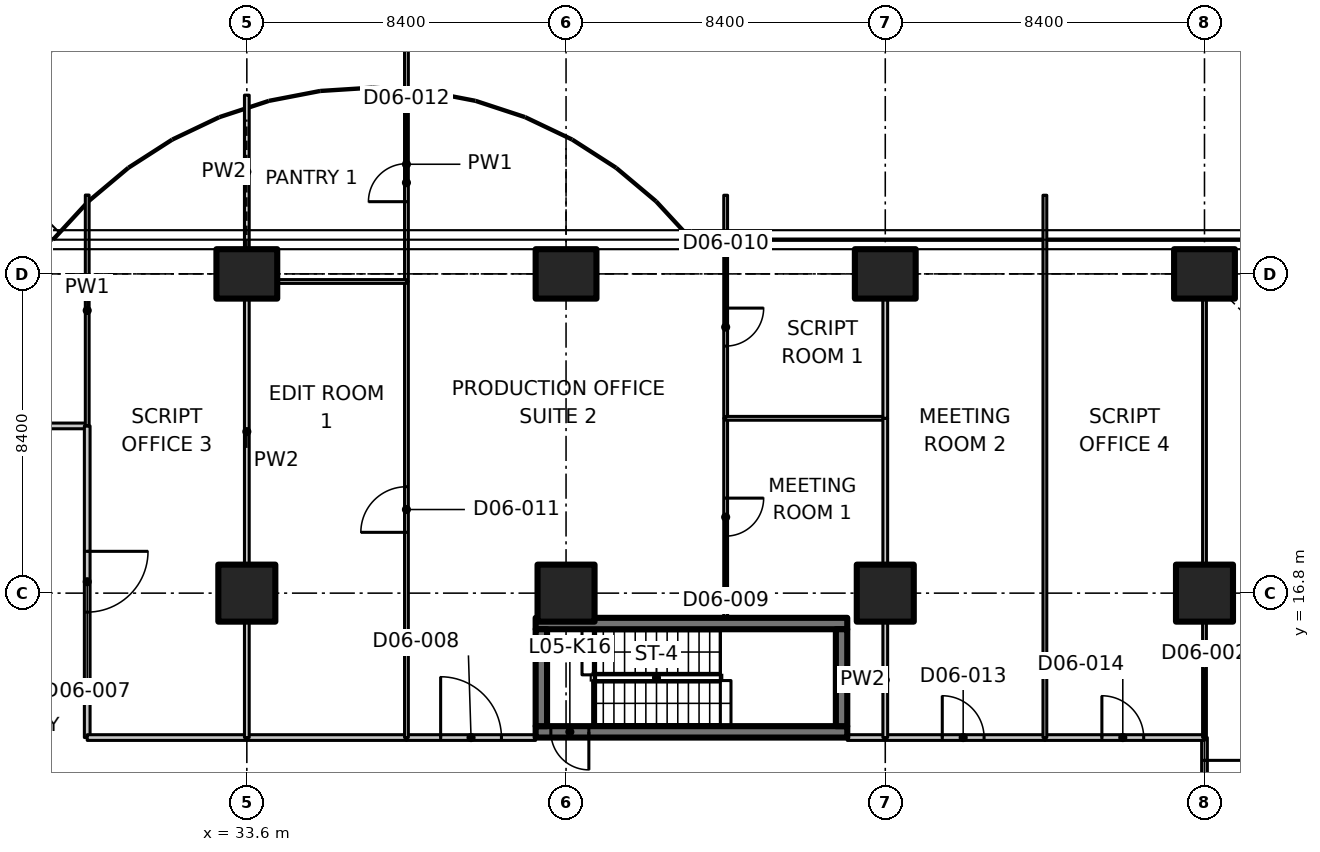
"""IFC4 building model, lengths in metres.
Left out: names, types, materials, properties, quantities, classifications, styles, units other than length and angle.
Written with IfcOpenShell. Run it as: python <this file> out.ifc"""

import sys

from ifc_helpers import new_model, si_unit, direction, frame, frame_2d, origin, origin_2d, place, context, subcontext, project, spatial, polyline, rectangle, outline, extrude, element, fill, save


model = new_model("IFC4")
c1 = context("Model", 3, precision=1e-05, world=origin(), true_north=direction((0.0, 1.0)))
c2 = subcontext(c1, "Body", "Model", "MODEL_VIEW")
j1 = project(units=[si_unit("LENGTHUNIT", "METRE"), si_unit("PLANEANGLEUNIT", "RADIAN")], contexts=[c1])
p1 = place(None, origin())
s1 = spatial("IfcSite", under=j1, at=p1, CompositionType="ELEMENT")
p2 = place(p1, origin())
s2 = spatial("IfcBuilding", under=s1, at=p2, CompositionType="ELEMENT")
p3 = place(p2, frame((0.0, 0.0, 32.0)))
s3 = spatial("IfcBuildingStorey", under=s2, at=p3, CompositionType="ELEMENT", Elevation=32.0)
p4 = place(p3, frame((33.6, 16.8, 0.0), z_axis=(0.0, 0.0, 1.0), x_axis=(1.0, 0.0, 0.0)))
e1 = element("IfcColumn", 1, at=p4, inside=s3, PredefinedType="COLUMN", context=c2, shape_type="SweptSolid", body=[
    extrude(rectangle(XDim=1.5, YDim=1.5, at=origin_2d()), origin(), (0.0, 0.0, 1.0), 4.25),
])
p5 = place(p3, frame((33.6, 25.2, 0.0), z_axis=(0.0, 0.0, 1.0), x_axis=(0.0, 1.0, 0.0)))
e2 = element("IfcColumn", 2, at=p5, inside=s3, PredefinedType="COLUMN", context=c2, shape_type="SweptSolid", body=[
    extrude(rectangle(XDim=1.3, YDim=1.6, at=origin_2d()), origin(), (0.0, 0.0, 1.0), 4.25),
])
p6 = place(p3, frame((42.0, 16.8, 0.0), z_axis=(0.0, 0.0, 1.0), x_axis=(1.0, 0.0, 0.0)))
e3 = element("IfcColumn", 3, at=p6, inside=s3, PredefinedType="COLUMN", context=c2, shape_type="SweptSolid", body=[
    extrude(rectangle(XDim=1.5, YDim=1.5, at=origin_2d()), origin(), (0.0, 0.0, 1.0), 4.25),
])
p7 = place(p3, frame((42.0, 25.2, 0.0), z_axis=(0.0, 0.0, 1.0), x_axis=(0.0, 1.0, 0.0)))
e4 = element("IfcColumn", 4, at=p7, inside=s3, PredefinedType="COLUMN", context=c2, shape_type="SweptSolid", body=[
    extrude(rectangle(XDim=1.3, YDim=1.6, at=origin_2d()), origin(), (0.0, 0.0, 1.0), 4.25),
])
p8 = place(p3, frame((50.4, 16.8, 0.0), z_axis=(0.0, 0.0, 1.0), x_axis=(1.0, 0.0, 0.0)))
e5 = element("IfcColumn", 5, at=p8, inside=s3, PredefinedType="COLUMN", context=c2, shape_type="SweptSolid", body=[
    extrude(rectangle(XDim=1.5, YDim=1.5, at=origin_2d()), origin(), (0.0, 0.0, 1.0), 4.25),
])
p9 = place(p3, frame((50.4, 25.2, 0.0), z_axis=(0.0, 0.0, 1.0), x_axis=(0.0, 1.0, 0.0)))
e6 = element("IfcColumn", 6, at=p9, inside=s3, PredefinedType="COLUMN", context=c2, shape_type="SweptSolid", body=[
    extrude(rectangle(XDim=1.3, YDim=1.6, at=origin_2d()), origin(), (0.0, 0.0, 1.0), 4.25),
])
p10 = place(p3, frame((58.8, 16.8, 0.0), z_axis=(0.0, 0.0, 1.0), x_axis=(1.0, 0.0, 0.0)))
e7 = element("IfcColumn", 7, at=p10, inside=s3, PredefinedType="COLUMN", context=c2, shape_type="SweptSolid", body=[
    extrude(rectangle(XDim=1.5, YDim=1.5, at=origin_2d()), origin(), (0.0, 0.0, 1.0), 4.25),
])
p11 = place(p3, frame((58.8, 25.2, 0.0), z_axis=(0.0, 0.0, 1.0), x_axis=(0.0, 1.0, 0.0)))
e8 = element("IfcColumn", 8, at=p11, inside=s3, PredefinedType="COLUMN", context=c2, shape_type="SweptSolid", body=[
    extrude(rectangle(XDim=1.3, YDim=1.6, at=origin_2d()), origin(), (0.0, 0.0, 1.0), 4.25),
])
p12 = place(p3, frame((49.4, 13.15, 0.0), z_axis=(0.0, 0.0, 1.0), x_axis=(-1.0, 0.0, 0.0)))
e9 = element("IfcWall", 9, at=p12, inside=s3, PredefinedType="SHEAR", context=c2, shape_type="SweptSolid", body=[
    extrude(rectangle(XDim=8.2, YDim=0.3, at=frame_2d((4.1, 0.0))), origin(), (0.0, 0.0, 1.0), 4.25),
])
p13 = place(p12, frame((6.8, 0.0, 0.0)))
e10 = element("IfcOpeningElement", 10, at=p13, cuts=e9, PredefinedType="OPENING", context=c2, shape_type="SweptSolid", body=[
    extrude(rectangle(XDim=1.0, YDim=2.1, at=frame_2d((0.5, 1.05))), frame((0.0, 0.16, 0.0), z_axis=(0.0, -1.0, 0.0), x_axis=(1.0, 0.0, 0.0)), (0.0, 0.0, 1.0), 0.32),
])
p14 = place(p3, frame((41.2, 16.0, 0.0), z_axis=(0.0, 0.0, 1.0), x_axis=(1.0, 0.0, 0.0)))
e11 = element("IfcWall", 11, at=p14, inside=s3, PredefinedType="SHEAR", context=c2, shape_type="SweptSolid", body=[
    extrude(rectangle(XDim=8.2, YDim=0.3, at=frame_2d((4.1, 0.0))), origin(), (0.0, 0.0, 1.0), 4.25),
])
for number, where, z_axis, x_axis in (
    (12, (41.35, 13.3, 0.0), (0.0, 0.0, 1.0), (0.0, 1.0, 0.0)),
    (13, (49.25, 13.3, 0.0), (0.0, 0.0, 1.0), (0.0, 1.0, 0.0)),
):
    element("IfcWall", number, at=place(p3, frame(where, z_axis=z_axis, x_axis=x_axis)), inside=s3, PredefinedType="SHEAR", context=c2, shape_type="SweptSolid", body=[
        extrude(rectangle(XDim=2.55, YDim=0.3, at=frame_2d((1.275, 0.0))), origin(), (0.0, 0.0, 1.0), 4.25),
    ])
p15 = place(p3, frame((25.2, 21.2, 0.0), z_axis=(0.0, 0.0, 1.0), x_axis=(1.0, 0.0, 0.0)))
e14 = element("IfcWall", 14, at=p15, inside=s3, PredefinedType="PARTITIONING", context=c2, shape_type="SweptSolid", body=[
    extrude(rectangle(XDim=4.2, YDim=0.15, at=frame_2d((2.1, 0.0))), origin(), (0.0, 0.0, 1.0), 4.23),
])
p16 = place(p3, frame((29.4, 21.2, 0.0), z_axis=(0.0, 0.0, 1.0), x_axis=(0.0, -1.0, 0.0)))
e15 = element("IfcWall", 15, at=p16, inside=s3, PredefinedType="PARTITIONING", context=c2, shape_type="SweptSolid", body=[
    extrude(rectangle(XDim=8.2, YDim=0.15, at=frame_2d((4.1, 0.0))), origin(), (0.0, 0.0, 1.0), 4.23),
])
p17 = place(p16, frame((3.3, 0.0, 0.0)))
e16 = element("IfcOpeningElement", 16, at=p17, cuts=e15, PredefinedType="OPENING", context=c2, shape_type="SweptSolid", body=[
    extrude(rectangle(XDim=1.6, YDim=2.1, at=frame_2d((0.8, 1.05))), frame((0.0, 0.085, 0.0), z_axis=(0.0, -1.0, 0.0), x_axis=(1.0, 0.0, 0.0)), (0.0, 0.0, 1.0), 0.17),
])
p18 = place(p3, frame((29.4, 27.275, 0.0), z_axis=(0.0, 0.0, 1.0), x_axis=(0.0, -1.0, 0.0)))
e17 = element("IfcWall", 17, at=p18, inside=s3, PredefinedType="PARTITIONING", context=c2, shape_type="SweptSolid", body=[
    extrude(outline(polyline([(0.0, 0.0), (6.075, 0.0), (6.075, 4.23), (2.525, 4.23), (2.523, 3.88), (1.627, 3.88), (1.625, 4.23), (0.0, 4.23), (0.0, 0.0)])), frame((0.0, 0.05, 0.0), z_axis=(0.0, -1.0, 0.0), x_axis=(1.0, 0.0, 0.0)), (0.0, 0.0, 1.0), 0.1),
])
p19 = place(p3, frame((28.432, 31.168, 0.0), z_axis=(0.0, 0.0, 1.0), x_axis=(-0.540854867502, -0.841115932734, 0.0)))
e18 = element("IfcWall", 18, at=p19, inside=s3, PredefinedType="PARTITIONING", context=c2, shape_type="SweptSolid", body=[
    extrude(rectangle(XDim=1.015, YDim=0.15, at=frame_2d((0.507, 0.0))), origin(), (0.0, 0.0, 1.0), 4.23),
])
p20 = place(p3, frame((58.8, 13.0, 0.0), z_axis=(0.0, 0.0, 1.0), x_axis=(0.0, -1.0, 0.0)))
e19 = element("IfcWall", 19, at=p20, inside=s3, PredefinedType="PARTITIONING", context=c2, shape_type="SweptSolid", body=[
    extrude(rectangle(XDim=3.4, YDim=0.15, at=frame_2d((1.7, 0.0))), origin(), (0.0, 0.0, 1.0), 4.23),
])
p21 = place(p20, frame((0.6, 0.0, 0.0)))
e20 = element("IfcOpeningElement", 20, at=p21, cuts=e19, PredefinedType="OPENING", context=c2, shape_type="SweptSolid", body=[
    extrude(rectangle(XDim=2.0, YDim=2.4, at=frame_2d((1.0, 1.2))), frame((0.0, 0.085, 0.0), z_axis=(0.0, -1.0, 0.0), x_axis=(1.0, 0.0, 0.0)), (0.0, 0.0, 1.0), 0.17),
])
p22 = place(p3, frame((29.4, 13.0, 0.0), z_axis=(0.0, 0.0, 1.0), x_axis=(1.0, 0.0, 0.0)))
e21 = element("IfcWall", 21, at=p22, inside=s3, PredefinedType="PARTITIONING", context=c2, shape_type="SweptSolid", body=[
    extrude(rectangle(XDim=4.2, YDim=0.15, at=frame_2d((2.1, 0.0))), origin(), (0.0, 0.0, 1.0), 4.23),
])
p23 = place(p3, frame((37.8, 13.0, 0.0), z_axis=(0.0, 0.0, 1.0), x_axis=(1.0, 0.0, 0.0)))
e22 = element("IfcWall", 22, at=p23, inside=s3, PredefinedType="PARTITIONING", context=c2, shape_type="SweptSolid", body=[
    extrude(rectangle(XDim=3.4, YDim=0.15, at=frame_2d((1.7, 0.0))), origin(), (0.0, 0.0, 1.0), 4.23),
])
p24 = place(p23, frame((0.9, 0.0, 0.0)))
e23 = element("IfcOpeningElement", 23, at=p24, cuts=e22, PredefinedType="OPENING", context=c2, shape_type="SweptSolid", body=[
    extrude(rectangle(XDim=1.6, YDim=2.1, at=frame_2d((0.8, 1.05))), frame((0.0, 0.085, 0.0), z_axis=(0.0, -1.0, 0.0), x_axis=(1.0, 0.0, 0.0)), (0.0, 0.0, 1.0), 0.17),
])
p25 = place(p3, frame((49.4, 13.0, 0.0), z_axis=(0.0, 0.0, 1.0), x_axis=(1.0, 0.0, 0.0)))
e24 = element("IfcWall", 24, at=p25, inside=s3, PredefinedType="PARTITIONING", context=c2, shape_type="SweptSolid", body=[
    extrude(rectangle(XDim=1.0, YDim=0.15, at=frame_2d((0.5, 0.0))), origin(), (0.0, 0.0, 1.0), 4.23),
])
p26 = place(p3, frame((33.6, 13.0, 0.0), z_axis=(0.0, 0.0, 1.0), x_axis=(1.0, 0.0, 0.0)))
e25 = element("IfcWall", 25, at=p26, inside=s3, PredefinedType="PARTITIONING", context=c2, shape_type="SweptSolid", body=[
    extrude(rectangle(XDim=4.2, YDim=0.15, at=frame_2d((2.1, 0.0))), origin(), (0.0, 0.0, 1.0), 4.23),
])
p27 = place(p3, frame((50.4, 13.0, 0.0), z_axis=(0.0, 0.0, 1.0), x_axis=(1.0, 0.0, 0.0)))
e26 = element("IfcWall", 26, at=p27, inside=s3, PredefinedType="PARTITIONING", context=c2, shape_type="SweptSolid", body=[
    extrude(rectangle(XDim=4.2, YDim=0.15, at=frame_2d((2.1, 0.0))), origin(), (0.0, 0.0, 1.0), 4.23),
])
p28 = place(p27, frame((1.5, 0.0, 0.0)))
e27 = element("IfcOpeningElement", 27, at=p28, cuts=e26, PredefinedType="OPENING", context=c2, shape_type="SweptSolid", body=[
    extrude(rectangle(XDim=1.1, YDim=2.1, at=frame_2d((0.55, 1.05))), frame((0.0, 0.085, 0.0), z_axis=(0.0, -1.0, 0.0), x_axis=(1.0, 0.0, 0.0)), (0.0, 0.0, 1.0), 0.17),
])
p29 = place(p3, frame((54.6, 13.0, 0.0), z_axis=(0.0, 0.0, 1.0), x_axis=(1.0, 0.0, 0.0)))
e28 = element("IfcWall", 28, at=p29, inside=s3, PredefinedType="PARTITIONING", context=c2, shape_type="SweptSolid", body=[
    extrude(rectangle(XDim=4.2, YDim=0.15, at=frame_2d((2.1, 0.0))), origin(), (0.0, 0.0, 1.0), 4.23),
])
p30 = place(p29, frame((1.5, 0.0, 0.0)))
e29 = element("IfcOpeningElement", 29, at=p30, cuts=e28, PredefinedType="OPENING", context=c2, shape_type="SweptSolid", body=[
    extrude(rectangle(XDim=1.1, YDim=2.1, at=frame_2d((0.55, 1.05))), frame((0.0, 0.085, 0.0), z_axis=(0.0, -1.0, 0.0), x_axis=(1.0, 0.0, 0.0)), (0.0, 0.0, 1.0), 0.17),
])
p31 = place(p3, frame((58.8, 13.0, 0.0), z_axis=(0.0, 0.0, 1.0), x_axis=(0.0, 1.0, 0.0)))
e30 = element("IfcWall", 30, at=p31, inside=s3, PredefinedType="PARTITIONING", context=c2, shape_type="SweptSolid", body=[
    extrude(rectangle(XDim=3.03, YDim=0.1, at=frame_2d((1.515, 0.0))), origin(), (0.0, 0.0, 1.0), 4.23),
])
p32 = place(p3, frame((58.8, 17.57, 0.0), z_axis=(0.0, 0.0, 1.0), x_axis=(0.0, 1.0, 0.0)))
e31 = element("IfcWall", 31, at=p32, inside=s3, PredefinedType="PARTITIONING", context=c2, shape_type="SweptSolid", body=[
    extrude(rectangle(XDim=6.96, YDim=0.1, at=frame_2d((3.48, 0.0))), origin(), (0.0, 0.0, 1.0), 4.23),
])
p33 = place(p3, frame((33.6, 24.53, 0.0), z_axis=(0.0, 0.0, 1.0), x_axis=(0.0, -1.0, 0.0)))
e32 = element("IfcWall", 32, at=p33, inside=s3, PredefinedType="PARTITIONING", context=c2, shape_type="SweptSolid", body=[
    extrude(rectangle(XDim=6.96, YDim=0.125, at=frame_2d((3.48, 0.0))), origin(), (0.0, 0.0, 1.0), 4.23),
])
p34 = place(p3, frame((33.6, 16.03, 0.0), z_axis=(0.0, 0.0, 1.0), x_axis=(0.0, -1.0, 0.0)))
e33 = element("IfcWall", 33, at=p34, inside=s3, PredefinedType="PARTITIONING", context=c2, shape_type="SweptSolid", body=[
    extrude(rectangle(XDim=3.03, YDim=0.125, at=frame_2d((1.515, 0.0))), origin(), (0.0, 0.0, 1.0), 4.23),
])
p35 = place(p3, frame((33.6, 29.904, 0.0), z_axis=(0.0, 0.0, 1.0), x_axis=(0.0, -1.0, 0.0)))
e34 = element("IfcWall", 34, at=p35, inside=s3, PredefinedType="PARTITIONING", context=c2, shape_type="SweptSolid", body=[
    extrude(rectangle(XDim=4.033, YDim=0.125, at=frame_2d((2.017, 0.0))), origin(), (0.0, 0.0, 1.0), 3.88),
])
p36 = place(p3, frame((46.2, 21.4, 0.0), z_axis=(0.0, 0.0, 1.0), x_axis=(0.0, -1.0, 0.0)))
e35 = element("IfcWall", 35, at=p36, inside=s3, PredefinedType="PARTITIONING", context=c2, shape_type="SweptSolid", body=[
    extrude(rectangle(XDim=5.25, YDim=0.1, at=frame_2d((2.625, 0.0))), origin(), (0.0, 0.0, 1.0), 4.23),
])
p37 = place(p36, frame((2.1, 0.0, 0.0)))
e36 = element("IfcOpeningElement", 36, at=p37, cuts=e35, PredefinedType="OPENING", context=c2, shape_type="SweptSolid", body=[
    extrude(rectangle(XDim=1.0, YDim=2.1, at=frame_2d((0.5, 1.05))), frame((0.0, 0.06, 0.0), z_axis=(0.0, -1.0, 0.0), x_axis=(1.0, 0.0, 0.0)), (0.0, 0.0, 1.0), 0.12),
])
p38 = place(p3, frame((46.2, 27.27, 0.0), z_axis=(0.0, 0.0, 1.0), x_axis=(0.0, -1.0, 0.0)))
e37 = element("IfcWall", 37, at=p38, inside=s3, PredefinedType="PARTITIONING", context=c2, shape_type="SweptSolid", body=[
    extrude(outline(polyline([(0.0, 0.0), (5.87, 0.0), (5.87, 4.23), (2.52, 4.23), (2.518, 3.88), (1.622, 3.88), (1.62, 4.23), (0.97, 4.23), (0.0, 4.23), (0.0, 0.0)])), frame((0.0, 0.05, 0.0), z_axis=(0.0, -1.0, 0.0), x_axis=(1.0, 0.0, 0.0)), (0.0, 0.0, 1.0), 0.1),
])
p39 = place(p38, frame((2.97, 0.0, 0.0)))
e38 = element("IfcOpeningElement", 38, at=p39, cuts=e37, PredefinedType="OPENING", context=c2, shape_type="SweptSolid", body=[
    extrude(rectangle(XDim=1.0, YDim=2.1, at=frame_2d((0.5, 1.05))), frame((0.0, 0.06, 0.0), z_axis=(0.0, -1.0, 0.0), x_axis=(1.0, 0.0, 0.0)), (0.0, 0.0, 1.0), 0.12),
])
p40 = place(p3, frame((37.8, 13.0, 0.0), z_axis=(0.0, 0.0, 1.0), x_axis=(0.0, 1.0, 0.0)))
e39 = element("IfcWall", 39, at=p40, inside=s3, PredefinedType="PARTITIONING", context=c2, shape_type="SweptSolid", body=[
    extrude(outline(polyline([(0.0, 0.0), (12.0, 0.0), (12.0, 3.88), (11.752, 3.88), (11.75, 4.23), (0.0, 4.23), (0.0, 0.0)])), frame((0.0, 0.05, 0.0), z_axis=(0.0, -1.0, 0.0), x_axis=(1.0, 0.0, 0.0)), (0.0, 0.0, 1.0), 0.1),
])
p41 = place(p40, frame((5.4, 0.0, 0.0)))
e40 = element("IfcOpeningElement", 40, at=p41, cuts=e39, PredefinedType="OPENING", context=c2, shape_type="SweptSolid", body=[
    extrude(rectangle(XDim=1.2, YDim=2.1, at=frame_2d((0.6, 1.05))), frame((0.0, 0.06, 0.0), z_axis=(0.0, -1.0, 0.0), x_axis=(1.0, 0.0, 0.0)), (0.0, 0.0, 1.0), 0.12),
])
p42 = place(p3, frame((37.8, 25.0, 0.0), z_axis=(0.0, 0.0, 1.0), x_axis=(0.0, 1.0, 0.0)))
e41 = element("IfcWall", 41, at=p42, inside=s3, PredefinedType="PARTITIONING", context=c2, shape_type="SweptSolid", body=[
    extrude(outline(polyline([(0.0, 0.0), (6.17, 0.0), (6.17, 4.23), (5.243, 4.23), (0.65, 4.23), (0.648, 3.88), (0.0, 3.88), (0.0, 0.0)])), frame((0.0, 0.05, 0.0), z_axis=(0.0, -1.0, 0.0), x_axis=(1.0, 0.0, 0.0)), (0.0, 0.0, 1.0), 0.1),
])
p43 = place(p42, frame((2.1, 0.0, 0.0)))
e42 = element("IfcOpeningElement", 42, at=p43, cuts=e41, PredefinedType="OPENING", context=c2, shape_type="SweptSolid", body=[
    extrude(rectangle(XDim=1.0, YDim=2.1, at=frame_2d((0.5, 1.05))), frame((0.0, 0.06, 0.0), z_axis=(0.0, -1.0, 0.0), x_axis=(1.0, 0.0, 0.0)), (0.0, 0.0, 1.0), 0.12),
])
p44 = place(p3, frame((46.2, 21.4, 0.0), z_axis=(0.0, 0.0, 1.0), x_axis=(1.0, 0.0, 0.0)))
e43 = element("IfcWall", 43, at=p44, inside=s3, PredefinedType="PARTITIONING", context=c2, shape_type="SweptSolid", body=[
    extrude(rectangle(XDim=4.2, YDim=0.1, at=frame_2d((2.1, 0.0))), origin(), (0.0, 0.0, 1.0), 4.23),
])
p45 = place(p3, frame((50.4, 21.4, 0.0), z_axis=(0.0, 0.0, 1.0), x_axis=(0.0, -1.0, 0.0)))
e44 = element("IfcWall", 44, at=p45, inside=s3, PredefinedType="PARTITIONING", context=c2, shape_type="SweptSolid", body=[
    extrude(rectangle(XDim=3.83, YDim=0.125, at=frame_2d((1.915, 0.0))), origin(), (0.0, 0.0, 1.0), 4.23),
])
p46 = place(p3, frame((50.4, 16.03, 0.0), z_axis=(0.0, 0.0, 1.0), x_axis=(0.0, -1.0, 0.0)))
e45 = element("IfcWall", 45, at=p46, inside=s3, PredefinedType="PARTITIONING", context=c2, shape_type="SweptSolid", body=[
    extrude(rectangle(XDim=3.03, YDim=0.125, at=frame_2d((1.515, 0.0))), origin(), (0.0, 0.0, 1.0), 4.23),
])
p47 = place(p3, frame((50.4, 24.53, 0.0), z_axis=(0.0, 0.0, 1.0), x_axis=(0.0, -1.0, 0.0)))
e46 = element("IfcWall", 46, at=p47, inside=s3, PredefinedType="PARTITIONING", context=c2, shape_type="SweptSolid", body=[
    extrude(rectangle(XDim=3.13, YDim=0.125, at=frame_2d((1.565, 0.0))), origin(), (0.0, 0.0, 1.0), 4.23),
])
p48 = place(p3, frame((34.42, 25.0, 0.0), z_axis=(0.0, 0.0, 1.0), x_axis=(1.0, 0.0, 0.0)))
e47 = element("IfcWall", 47, at=p48, inside=s3, PredefinedType="PARTITIONING", context=c2, shape_type="SweptSolid", body=[
    extrude(rectangle(XDim=3.38, YDim=0.1, at=frame_2d((1.69, 0.0))), origin(), (0.0, 0.0, 1.0), 3.88),
])
p49 = place(p3, frame((54.6, 27.27, 0.0), z_axis=(0.0, 0.0, 1.0), x_axis=(0.0, -1.0, 0.0)))
e48 = element("IfcWall", 48, at=p49, inside=s3, PredefinedType="PARTITIONING", context=c2, shape_type="SweptSolid", body=[
    extrude(outline(polyline([(0.0, 0.0), (14.27, 0.0), (14.27, 4.23), (2.52, 4.23), (2.518, 3.88), (1.622, 3.88), (1.62, 4.23), (0.97, 4.23), (0.0, 4.23), (0.0, 0.0)])), frame((0.0, 0.05, 0.0), z_axis=(0.0, -1.0, 0.0), x_axis=(1.0, 0.0, 0.0)), (0.0, 0.0, 1.0), 0.1),
])
p50 = place(p13, origin())
e49 = element("IfcDoor", 49, at=p50, inside=s3, OperationType="SINGLE_SWING_LEFT", PredefinedType="DOOR", context=c2, shape_type="SweptSolid", body=[
    extrude(rectangle(XDim=1.0, YDim=2.1, at=frame_2d((0.5, 1.05))), frame((0.0, 0.025, 0.0), z_axis=(0.0, -1.0, 0.0), x_axis=(1.0, 0.0, 0.0)), (0.0, 0.0, 1.0), 0.05),
])
fill(e10, e49)
p51 = place(p21, origin())
e50 = element("IfcDoor", 50, at=p51, inside=s3, OperationType="DOUBLE_DOOR_SINGLE_SWING", PredefinedType="DOOR", context=c2, shape_type="SweptSolid", body=[
    extrude(rectangle(XDim=2.0, YDim=2.4, at=frame_2d((1.0, 1.2))), frame((0.0, 0.025, 0.0), z_axis=(0.0, -1.0, 0.0), x_axis=(1.0, 0.0, 0.0)), (0.0, 0.0, 1.0), 0.05),
])
fill(e20, e50)
p52 = place(p17, origin())
e51 = element("IfcDoor", 51, at=p52, inside=s3, OperationType="DOUBLE_DOOR_SINGLE_SWING", PredefinedType="DOOR", context=c2, shape_type="SweptSolid", body=[
    extrude(rectangle(XDim=1.6, YDim=2.1, at=frame_2d((0.8, 1.05))), frame((0.0, 0.025, 0.0), z_axis=(0.0, -1.0, 0.0), x_axis=(1.0, 0.0, 0.0)), (0.0, 0.0, 1.0), 0.05),
])
fill(e16, e51)
p53 = place(p24, origin())
e52 = element("IfcDoor", 52, at=p53, inside=s3, OperationType="DOUBLE_DOOR_SINGLE_SWING", PredefinedType="DOOR", context=c2, shape_type="SweptSolid", body=[
    extrude(rectangle(XDim=1.6, YDim=2.1, at=frame_2d((0.8, 1.05))), frame((0.0, 0.025, 0.0), z_axis=(0.0, -1.0, 0.0), x_axis=(1.0, 0.0, 0.0)), (0.0, 0.0, 1.0), 0.05),
])
fill(e23, e52)
p54 = place(p37, origin())
e53 = element("IfcDoor", 53, at=p54, inside=s3, OperationType="SINGLE_SWING_LEFT", PredefinedType="DOOR", context=c2, shape_type="SweptSolid", body=[
    extrude(rectangle(XDim=1.0, YDim=2.1, at=frame_2d((0.5, 1.05))), frame((0.0, 0.025, 0.0), z_axis=(0.0, -1.0, 0.0), x_axis=(1.0, 0.0, 0.0)), (0.0, 0.0, 1.0), 0.05),
])
fill(e36, e53)
p55 = place(p39, origin())
e54 = element("IfcDoor", 54, at=p55, inside=s3, OperationType="SINGLE_SWING_LEFT", PredefinedType="DOOR", context=c2, shape_type="SweptSolid", body=[
    extrude(rectangle(XDim=1.0, YDim=2.1, at=frame_2d((0.5, 1.05))), frame((0.0, 0.025, 0.0), z_axis=(0.0, -1.0, 0.0), x_axis=(1.0, 0.0, 0.0)), (0.0, 0.0, 1.0), 0.05),
])
fill(e38, e54)
p56 = place(p41, origin())
e55 = element("IfcDoor", 55, at=p56, inside=s3, OperationType="SINGLE_SWING_LEFT", PredefinedType="DOOR", context=c2, shape_type="SweptSolid", body=[
    extrude(rectangle(XDim=1.2, YDim=2.1, at=frame_2d((0.6, 1.05))), frame((0.0, 0.025, 0.0), z_axis=(0.0, -1.0, 0.0), x_axis=(1.0, 0.0, 0.0)), (0.0, 0.0, 1.0), 0.05),
])
fill(e40, e55)
p57 = place(p43, origin())
e56 = element("IfcDoor", 56, at=p57, inside=s3, OperationType="SINGLE_SWING_LEFT", PredefinedType="DOOR", context=c2, shape_type="SweptSolid", body=[
    extrude(rectangle(XDim=1.0, YDim=2.1, at=frame_2d((0.5, 1.05))), frame((0.0, 0.025, 0.0), z_axis=(0.0, -1.0, 0.0), x_axis=(1.0, 0.0, 0.0)), (0.0, 0.0, 1.0), 0.05),
])
fill(e42, e56)
p58 = place(p28, origin())
e57 = element("IfcDoor", 57, at=p58, inside=s3, OperationType="SINGLE_SWING_LEFT", PredefinedType="DOOR", context=c2, shape_type="SweptSolid", body=[
    extrude(rectangle(XDim=1.1, YDim=2.1, at=frame_2d((0.55, 1.05))), frame((0.0, 0.025, 0.0), z_axis=(0.0, -1.0, 0.0), x_axis=(1.0, 0.0, 0.0)), (0.0, 0.0, 1.0), 0.05),
])
fill(e27, e57)
p59 = place(p30, origin())
e58 = element("IfcDoor", 58, at=p59, inside=s3, OperationType="SINGLE_SWING_LEFT", PredefinedType="DOOR", context=c2, shape_type="SweptSolid", body=[
    extrude(rectangle(XDim=1.1, YDim=2.1, at=frame_2d((0.55, 1.05))), frame((0.0, 0.025, 0.0), z_axis=(0.0, -1.0, 0.0), x_axis=(1.0, 0.0, 0.0)), (0.0, 0.0, 1.0), 0.05),
])
fill(e29, e58)
save(model, sys.argv[1])
